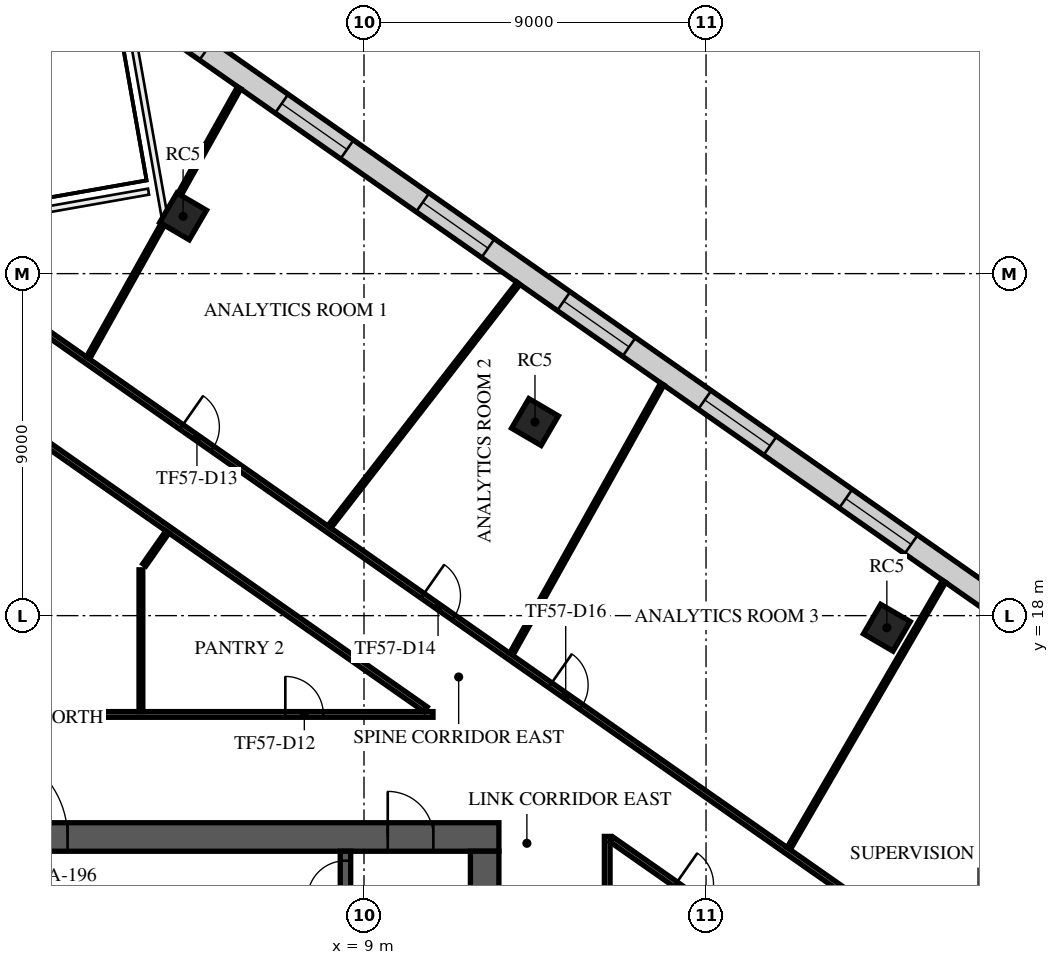
"""IFC4 building model, lengths in metres.
Left out: names, types, materials, properties, quantities, classifications, styles, units other than length and angle.
Written with IfcOpenShell. Run it as: python <this file> out.ifc"""

import sys

from ifc_helpers import new_model, si_unit, direction, frame, frame_2d, origin, origin_2d, place, context, subcontext, project, spatial, rectangle, extrude, element, fill, save


model = new_model("IFC4")
c1 = context("Model", 3, precision=1e-05, world=origin(), true_north=direction((0.0, 1.0)))
c2 = subcontext(c1, "Body", "Model", "MODEL_VIEW")
j1 = project(units=[si_unit("LENGTHUNIT", "METRE"), si_unit("PLANEANGLEUNIT", "RADIAN")], contexts=[c1])
p1 = place(None, origin())
s1 = spatial("IfcSite", under=j1, at=p1, CompositionType="ELEMENT")
p2 = place(p1, origin())
s2 = spatial("IfcBuilding", under=s1, at=p2, CompositionType="ELEMENT")
p3 = place(p2, frame((0.0, 0.0, 246.9)))
s3 = spatial("IfcBuildingStorey", under=s2, at=p3, CompositionType="ELEMENT", Elevation=246.9)
for number, where, z_axis, x_axis in (
    (1, (22.758, 17.682, 0.0), (0.0, 0.0, 1.0), (0.505, 0.863, 0.0)),
    (2, (13.499, 23.094, 0.0), (0.0, 0.0, 1.0), (0.505, 0.863, 0.0)),
    (3, (4.24, 28.506, 0.0), (0.0, 0.0, 1.0), (0.505, 0.863, 0.0)),
):
    element("IfcColumn", number, at=place(p3, frame(where, z_axis=z_axis, x_axis=x_axis)), inside=s3, PredefinedType="COLUMN", context=c2, shape_type="SweptSolid", body=[
        extrude(rectangle(XDim=0.9, YDim=0.9, at=origin_2d()), origin(), (0.0, 0.0, 1.0), 4.0),
    ])
p4 = place(p3, frame((-12.55, 12.175, 0.0), z_axis=(0.0, 0.0, 1.0), x_axis=(1.0, 0.0, 0.0)))
e4 = element("IfcWall", 4, at=p4, inside=s3, PredefinedType="SHEAR", context=c2, shape_type="SweptSolid", body=[
    extrude(rectangle(XDim=25.1, YDim=0.75, at=frame_2d((12.55, 0.0))), origin(), (0.0, 0.0, 1.0), 3.64),
])
p5 = place(p4, frame((11.35, 0.0, 0.0)))
e5 = element("IfcOpeningElement", 5, at=p5, cuts=e4, PredefinedType="OPENING", context=c2, shape_type="SweptSolid", body=[
    extrude(rectangle(XDim=2.4, YDim=2.4, at=frame_2d((1.2, 1.2))), frame((0.0, 0.385, 0.0), z_axis=(0.0, -1.0, 0.0), x_axis=(1.0, 0.0, 0.0)), (0.0, 0.0, 1.0), 0.77),
])
p6 = place(p4, frame((22.175, 0.0, 0.0)))
e6 = element("IfcOpeningElement", 6, at=p6, cuts=e4, PredefinedType="OPENING", context=c2, shape_type="SweptSolid", body=[
    extrude(rectangle(XDim=1.2, YDim=2.1, at=frame_2d((0.6, 1.05))), frame((0.0, 0.385, 0.0), z_axis=(0.0, -1.0, 0.0), x_axis=(1.0, 0.0, 0.0)), (0.0, 0.0, 1.0), 0.77),
])
p7 = place(p4, frame((1.15, 0.0, 0.0)))
e7 = element("IfcOpeningElement", 7, at=p7, cuts=e4, PredefinedType="OPENING", context=c2, shape_type="SweptSolid", body=[
    extrude(rectangle(XDim=1.0, YDim=2.1, at=frame_2d((0.5, 1.05))), frame((0.0, 0.385, 0.0), z_axis=(0.0, -1.0, 0.0), x_axis=(1.0, 0.0, 0.0)), (0.0, 0.0, 1.0), 0.77),
])
p8 = place(p3, frame((12.175, -11.8, 0.0), z_axis=(0.0, 0.0, 1.0), x_axis=(0.0, 1.0, 0.0)))
e8 = element("IfcWall", 8, at=p8, inside=s3, PredefinedType="SHEAR", context=c2, shape_type="SweptSolid", body=[
    extrude(rectangle(XDim=23.6, YDim=0.75, at=frame_2d((11.8, 0.0))), origin(), (0.0, 0.0, 1.0), 3.64),
])
p9 = place(p8, frame((10.6, 0.0, 0.0)))
e9 = element("IfcOpeningElement", 9, at=p9, cuts=e8, PredefinedType="OPENING", context=c2, shape_type="SweptSolid", body=[
    extrude(rectangle(XDim=2.4, YDim=2.4, at=frame_2d((1.2, 1.2))), frame((0.0, 0.385, 0.0), z_axis=(0.0, -1.0, 0.0), x_axis=(1.0, 0.0, 0.0)), (0.0, 0.0, 1.0), 0.77),
])
p10 = place(p3, frame((8.512, 4.55, 0.0), z_axis=(0.0, 0.0, 1.0), x_axis=(0.0, 1.0, 0.0)))
e10 = element("IfcWall", 10, at=p10, inside=s3, PredefinedType="SOLIDWALL", context=c2, shape_type="SweptSolid", body=[
    extrude(rectangle(XDim=7.25, YDim=0.275, at=frame_2d((3.625, 0.0))), origin(), (0.0, 0.0, 1.0), 3.64),
])
p11 = place(p10, frame((6.0, 0.0, 0.0)))
e11 = element("IfcOpeningElement", 11, at=p11, cuts=e10, PredefinedType="OPENING", context=c2, shape_type="SweptSolid", body=[
    extrude(rectangle(XDim=1.0, YDim=2.1, at=frame_2d((0.5, 1.05))), frame((0.0, 0.147, 0.0), z_axis=(0.0, -1.0, 0.0), x_axis=(1.0, 0.0, 0.0)), (0.0, 0.0, 1.0), 0.295),
])
p12 = place(p3, frame((31.815, 13.98, 0.0), z_axis=(0.0, 0.0, 1.0), x_axis=(-0.819152162902, 0.573576266955, 0.0)))
e12 = element("IfcWall", 12, at=p12, inside=s3, PredefinedType="STANDARD", context=c2, shape_type="SweptSolid", body=[
    extrude(rectangle(XDim=36.243, YDim=0.6, at=frame_2d((18.122, 0.0))), origin(), (0.0, 0.0, 1.0), 3.64),
])
p13 = place(p12, frame((1.215, 0.0, 0.9)))
e13 = element("IfcOpeningElement", 13, at=p13, cuts=e12, PredefinedType="OPENING", context=c2, shape_type="SweptSolid", body=[
    extrude(rectangle(XDim=2.1, YDim=2.1, at=frame_2d((1.05, 1.05))), frame((0.0, 0.31, 0.0), z_axis=(0.0, -1.0, 0.0), x_axis=(1.0, 0.0, 0.0)), (0.0, 0.0, 1.0), 0.62),
])
p14 = place(p12, frame((5.746, 0.0, 0.9)))
e14 = element("IfcOpeningElement", 14, at=p14, cuts=e12, PredefinedType="OPENING", context=c2, shape_type="SweptSolid", body=[
    extrude(rectangle(XDim=2.1, YDim=2.1, at=frame_2d((1.05, 1.05))), frame((0.0, 0.31, 0.0), z_axis=(0.0, -1.0, 0.0), x_axis=(1.0, 0.0, 0.0)), (0.0, 0.0, 1.0), 0.62),
])
p15 = place(p12, frame((10.276, 0.0, 0.9)))
e15 = element("IfcOpeningElement", 15, at=p15, cuts=e12, PredefinedType="OPENING", context=c2, shape_type="SweptSolid", body=[
    extrude(rectangle(XDim=2.1, YDim=2.1, at=frame_2d((1.05, 1.05))), frame((0.0, 0.31, 0.0), z_axis=(0.0, -1.0, 0.0), x_axis=(1.0, 0.0, 0.0)), (0.0, 0.0, 1.0), 0.62),
])
p16 = place(p12, frame((14.806, 0.0, 0.9)))
e16 = element("IfcOpeningElement", 16, at=p16, cuts=e12, PredefinedType="OPENING", context=c2, shape_type="SweptSolid", body=[
    extrude(rectangle(XDim=2.1, YDim=2.1, at=frame_2d((1.05, 1.05))), frame((0.0, 0.31, 0.0), z_axis=(0.0, -1.0, 0.0), x_axis=(1.0, 0.0, 0.0)), (0.0, 0.0, 1.0), 0.62),
])
p17 = place(p12, frame((19.337, 0.0, 0.9)))
e17 = element("IfcOpeningElement", 17, at=p17, cuts=e12, PredefinedType="OPENING", context=c2, shape_type="SweptSolid", body=[
    extrude(rectangle(XDim=2.1, YDim=2.1, at=frame_2d((1.05, 1.05))), frame((0.0, 0.31, 0.0), z_axis=(0.0, -1.0, 0.0), x_axis=(1.0, 0.0, 0.0)), (0.0, 0.0, 1.0), 0.62),
])
p18 = place(p12, frame((23.867, 0.0, 0.9)))
e18 = element("IfcOpeningElement", 18, at=p18, cuts=e12, PredefinedType="OPENING", context=c2, shape_type="SweptSolid", body=[
    extrude(rectangle(XDim=2.1, YDim=2.1, at=frame_2d((1.05, 1.05))), frame((0.0, 0.31, 0.0), z_axis=(0.0, -1.0, 0.0), x_axis=(1.0, 0.0, 0.0)), (0.0, 0.0, 1.0), 0.62),
])
p19 = place(p12, frame((28.398, 0.0, 0.9)))
e19 = element("IfcOpeningElement", 19, at=p19, cuts=e12, PredefinedType="OPENING", context=c2, shape_type="SweptSolid", body=[
    extrude(rectangle(XDim=2.1, YDim=2.1, at=frame_2d((1.05, 1.05))), frame((0.0, 0.31, 0.0), z_axis=(0.0, -1.0, 0.0), x_axis=(1.0, 0.0, 0.0)), (0.0, 0.0, 1.0), 0.62),
])
p20 = place(p12, frame((32.928, 0.0, 0.9)))
e20 = element("IfcOpeningElement", 20, at=p20, cuts=e12, PredefinedType="OPENING", context=c2, shape_type="SweptSolid", body=[
    extrude(rectangle(XDim=2.1, YDim=2.1, at=frame_2d((1.05, 1.05))), frame((0.0, 0.31, 0.0), z_axis=(0.0, -1.0, 0.0), x_axis=(1.0, 0.0, 0.0)), (0.0, 0.0, 1.0), 0.62),
])
p21 = place(p3, frame((-15.325, 15.4, 0.0), z_axis=(0.0, 0.0, 1.0), x_axis=(1.0, 0.0, 0.0)))
e21 = element("IfcWall", 21, at=p21, inside=s3, PredefinedType="PARTITIONING", context=c2, shape_type="SweptSolid", body=[
    extrude(rectangle(XDim=26.141, YDim=0.15, at=frame_2d((13.07, 0.0))), origin(), (0.0, 0.0, 1.0), 3.24),
])
p22 = place(p21, frame((9.55, 0.0, 0.0)))
e22 = element("IfcOpeningElement", 22, at=p22, cuts=e21, PredefinedType="OPENING", context=c2, shape_type="SweptSolid", body=[
    extrude(rectangle(XDim=1.0, YDim=2.1, at=frame_2d((0.5, 1.05))), frame((0.0, 0.085, 0.0), z_axis=(0.0, -1.0, 0.0), x_axis=(1.0, 0.0, 0.0)), (0.0, 0.0, 1.0), 0.17),
])
p23 = place(p21, frame((22.255, 0.0, 0.0)))
e23 = element("IfcOpeningElement", 23, at=p23, cuts=e21, PredefinedType="OPENING", context=c2, shape_type="SweptSolid", body=[
    extrude(rectangle(XDim=1.0, YDim=2.1, at=frame_2d((0.5, 1.05))), frame((0.0, 0.085, 0.0), z_axis=(0.0, -1.0, 0.0), x_axis=(1.0, 0.0, 0.0)), (0.0, 0.0, 1.0), 0.17),
])
p24 = place(p3, frame((-3.266, 25.26, 0.0), z_axis=(0.0, 0.0, 1.0), x_axis=(0.819150723298, -0.573578322917, 0.0)))
e24 = element("IfcWall", 24, at=p24, inside=s3, PredefinedType="PARTITIONING", context=c2, shape_type="SweptSolid", body=[
    extrude(rectangle(XDim=16.953, YDim=0.15, at=frame_2d((8.476, 0.0))), origin(), (0.0, 0.0, 1.0), 3.24),
])
p25 = place(p24, frame((2.55, 0.0, 0.0)))
e25 = element("IfcOpeningElement", 25, at=p25, cuts=e24, PredefinedType="OPENING", context=c2, shape_type="SweptSolid", body=[
    extrude(rectangle(XDim=1.8, YDim=2.1, at=frame_2d((0.9, 1.05))), frame((0.0, 0.085, 0.0), z_axis=(0.0, -1.0, 0.0), x_axis=(1.0, 0.0, 0.0)), (0.0, 0.0, 1.0), 0.17),
])
p26 = place(p3, frame((-1.89, 27.226, 0.0), z_axis=(0.0, 0.0, 1.0), x_axis=(0.819163235761, -0.573560452941, 0.0)))
e26 = element("IfcWall", 26, at=p26, inside=s3, PredefinedType="PARTITIONING", context=c2, shape_type="SweptSolid", body=[
    extrude(rectangle(XDim=34.403, YDim=0.15, at=frame_2d((17.202, 0.0))), origin(), (0.0, 0.0, 1.0), 3.24),
])
p27 = place(p26, frame((7.427, 0.0, 0.0)))
e27 = element("IfcOpeningElement", 27, at=p27, cuts=e26, PredefinedType="OPENING", context=c2, shape_type="SweptSolid", body=[
    extrude(rectangle(XDim=1.0, YDim=2.1, at=frame_2d((0.5, 1.05))), frame((0.0, 0.085, 0.0), z_axis=(0.0, -1.0, 0.0), x_axis=(1.0, 0.0, 0.0)), (0.0, 0.0, 1.0), 0.17),
])
p28 = place(p26, frame((15.173, 0.0, 0.0)))
e28 = element("IfcOpeningElement", 28, at=p28, cuts=e26, PredefinedType="OPENING", context=c2, shape_type="SweptSolid", body=[
    extrude(rectangle(XDim=1.0, YDim=2.1, at=frame_2d((0.5, 1.05))), frame((0.0, 0.085, 0.0), z_axis=(0.0, -1.0, 0.0), x_axis=(1.0, 0.0, 0.0)), (0.0, 0.0, 1.0), 0.17),
])
p29 = place(p26, frame((19.273, 0.0, 0.0)))
e29 = element("IfcOpeningElement", 29, at=p29, cuts=e26, PredefinedType="OPENING", context=c2, shape_type="SweptSolid", body=[
    extrude(rectangle(XDim=1.0, YDim=2.1, at=frame_2d((0.5, 1.05))), frame((0.0, 0.085, 0.0), z_axis=(0.0, -1.0, 0.0), x_axis=(1.0, 0.0, 0.0)), (0.0, 0.0, 1.0), 0.17),
])
p30 = place(p3, frame((15.4, 2.664, 0.0), z_axis=(0.0, 0.0, 1.0), x_axis=(0.0, 1.0, 0.0)))
e30 = element("IfcWall", 30, at=p30, inside=s3, PredefinedType="PARTITIONING", context=c2, shape_type="SweptSolid", body=[
    extrude(rectangle(XDim=9.526, YDim=0.15, at=frame_2d((4.763, 0.0))), origin(), (0.0, 0.0, 1.0), 3.24),
])
p31 = place(p3, frame((15.518, 12.107, 0.0), z_axis=(0.0, 0.0, 1.0), x_axis=(0.819171924474, -0.573548043457, 0.0)))
e31 = element("IfcWall", 31, at=p31, inside=s3, PredefinedType="PARTITIONING", context=c2, shape_type="SweptSolid", body=[
    extrude(rectangle(XDim=11.471, YDim=0.15, at=frame_2d((5.736, 0.0))), origin(), (0.0, 0.0, 1.0), 3.24),
])
p32 = place(p31, frame((2.05, 0.0, 0.0)))
e32 = element("IfcOpeningElement", 32, at=p32, cuts=e31, PredefinedType="OPENING", context=c2, shape_type="SweptSolid", body=[
    extrude(rectangle(XDim=1.0, YDim=2.1, at=frame_2d((0.5, 1.05))), frame((0.0, 0.085, 0.0), z_axis=(0.0, -1.0, 0.0), x_axis=(1.0, 0.0, 0.0)), (0.0, 0.0, 1.0), 0.17),
])
p33 = place(p31, frame((10.027, 0.0, 0.0)))
e33 = element("IfcOpeningElement", 33, at=p33, cuts=e31, PredefinedType="OPENING", context=c2, shape_type="SweptSolid", body=[
    extrude(rectangle(XDim=1.0, YDim=2.1, at=frame_2d((0.5, 1.05))), frame((0.0, 0.085, 0.0), z_axis=(0.0, -1.0, 0.0), x_axis=(1.0, 0.0, 0.0)), (0.0, 0.0, 1.0), 0.17),
])
p34 = place(p3, frame((1.739, 24.783, 0.0), z_axis=(0.0, 0.0, 1.0), x_axis=(0.488204523876, 0.872729249462, 0.0)))
e34 = element("IfcWall", 34, at=p34, inside=s3, PredefinedType="PARTITIONING", context=c2, shape_type="SweptSolid", body=[
    extrude(rectangle(XDim=4.027, YDim=0.1, at=frame_2d((2.013, 0.0))), origin(), (0.0, 0.0, 1.0), 3.24),
])
p35 = place(p3, frame((3.13, 15.475, 0.0), z_axis=(0.0, 0.0, 1.0), x_axis=(0.0, 1.0, 0.0)))
e35 = element("IfcWall", 35, at=p35, inside=s3, PredefinedType="PARTITIONING", context=c2, shape_type="SweptSolid", body=[
    extrude(rectangle(XDim=3.731, YDim=0.1, at=frame_2d((1.865, 0.0))), origin(), (0.0, 0.0, 1.0), 3.64),
])
p36 = place(p3, frame((3.221, 19.336, 0.0), z_axis=(0.0, 0.0, 1.0), x_axis=(0.573214319636, 0.819405481898, 0.0)))
e36 = element("IfcWall", 36, at=p36, inside=s3, PredefinedType="PARTITIONING", context=c2, shape_type="SweptSolid", body=[
    extrude(rectangle(XDim=1.057, YDim=0.1, at=frame_2d((0.529, 0.0))), origin(), (0.0, 0.0, 1.0), 3.24),
])
p37 = place(p3, frame((4.145, 29.083, 0.0), z_axis=(0.0, 0.0, 1.0), x_axis=(0.488182285446, 0.872741689263, 0.0)))
e37 = element("IfcWall", 37, at=p37, inside=s3, PredefinedType="PARTITIONING", context=c2, shape_type="SweptSolid", body=[
    extrude(rectangle(XDim=3.214, YDim=0.1, at=frame_2d((1.607, 0.0))), origin(), (0.0, 0.0, 1.0), 3.64),
])
p38 = place(p3, frame((8.089, 20.334, 0.0), z_axis=(0.0, 0.0, 1.0), x_axis=(0.613179783631, 0.789943385912, 0.0)))
e38 = element("IfcWall", 38, at=p38, inside=s3, PredefinedType="PARTITIONING", context=c2, shape_type="SweptSolid", body=[
    extrude(rectangle(XDim=8.112, YDim=0.1, at=frame_2d((4.056, 0.0))), origin(), (0.0, 0.0, 1.0), 3.24),
])
p39 = place(p3, frame((12.876, 16.985, 0.0), z_axis=(0.0, 0.0, 1.0), x_axis=(0.487744732035, 0.872986297929, 0.0)))
e39 = element("IfcWall", 39, at=p39, inside=s3, PredefinedType="PARTITIONING", context=c2, shape_type="SweptSolid", body=[
    extrude(rectangle(XDim=8.141, YDim=0.1, at=frame_2d((4.07, 0.0))), origin(), (0.0, 0.0, 1.0), 3.24),
])
p40 = place(p3, frame((20.177, 11.873, 0.0), z_axis=(0.0, 0.0, 1.0), x_axis=(0.502475319919, 0.864591552626, 0.0)))
e40 = element("IfcWall", 40, at=p40, inside=s3, PredefinedType="PARTITIONING", context=c2, shape_type="SweptSolid", body=[
    extrude(rectangle(XDim=8.128, YDim=0.1, at=frame_2d((4.064, 0.0))), origin(), (0.0, 0.0, 1.0), 3.24),
])
p41 = place(p5, origin())
e41 = element("IfcDoor", 41, at=p41, inside=s3, OperationType="SINGLE_SWING_LEFT", PredefinedType="DOOR", context=c2, shape_type="SweptSolid", body=[
    extrude(rectangle(XDim=2.4, YDim=2.4, at=frame_2d((1.2, 1.2))), frame((0.0, 0.025, 0.0), z_axis=(0.0, -1.0, 0.0), x_axis=(1.0, 0.0, 0.0)), (0.0, 0.0, 1.0), 0.05),
])
fill(e5, e41)
p42 = place(p6, origin())
e42 = element("IfcDoor", 42, at=p42, inside=s3, OperationType="SINGLE_SWING_LEFT", PredefinedType="DOOR", context=c2, shape_type="SweptSolid", body=[
    extrude(rectangle(XDim=1.2, YDim=2.1, at=frame_2d((0.6, 1.05))), frame((0.0, 0.025, 0.0), z_axis=(0.0, -1.0, 0.0), x_axis=(1.0, 0.0, 0.0)), (0.0, 0.0, 1.0), 0.05),
])
fill(e6, e42)
p43 = place(p11, origin())
e43 = element("IfcDoor", 43, at=p43, inside=s3, OperationType="SINGLE_SWING_LEFT", PredefinedType="DOOR", context=c2, shape_type="SweptSolid", body=[
    extrude(rectangle(XDim=1.0, YDim=2.1, at=frame_2d((0.5, 1.05))), frame((0.0, 0.025, 0.0), z_axis=(0.0, -1.0, 0.0), x_axis=(1.0, 0.0, 0.0)), (0.0, 0.0, 1.0), 0.05),
])
fill(e11, e43)
p44 = place(p15, origin())
e44 = element("IfcWindow", 44, at=p44, inside=s3, PartitioningType="SINGLE_PANEL", PredefinedType="WINDOW", context=c2, shape_type="SweptSolid", body=[
    extrude(rectangle(XDim=2.1, YDim=2.1, at=frame_2d((1.05, 1.05))), frame((0.0, 0.03, 0.0), z_axis=(0.0, -1.0, 0.0), x_axis=(1.0, 0.0, 0.0)), (0.0, 0.0, 1.0), 0.06),
])
fill(e15, e44)
p45 = place(p16, origin())
e45 = element("IfcWindow", 45, at=p45, inside=s3, PartitioningType="SINGLE_PANEL", PredefinedType="WINDOW", context=c2, shape_type="SweptSolid", body=[
    extrude(rectangle(XDim=2.1, YDim=2.1, at=frame_2d((1.05, 1.05))), frame((0.0, 0.03, 0.0), z_axis=(0.0, -1.0, 0.0), x_axis=(1.0, 0.0, 0.0)), (0.0, 0.0, 1.0), 0.06),
])
fill(e16, e45)
p46 = place(p17, origin())
e46 = element("IfcWindow", 46, at=p46, inside=s3, PartitioningType="SINGLE_PANEL", PredefinedType="WINDOW", context=c2, shape_type="SweptSolid", body=[
    extrude(rectangle(XDim=2.1, YDim=2.1, at=frame_2d((1.05, 1.05))), frame((0.0, 0.03, 0.0), z_axis=(0.0, -1.0, 0.0), x_axis=(1.0, 0.0, 0.0)), (0.0, 0.0, 1.0), 0.06),
])
fill(e17, e46)
p47 = place(p18, origin())
e47 = element("IfcWindow", 47, at=p47, inside=s3, PartitioningType="SINGLE_PANEL", PredefinedType="WINDOW", context=c2, shape_type="SweptSolid", body=[
    extrude(rectangle(XDim=2.1, YDim=2.1, at=frame_2d((1.05, 1.05))), frame((0.0, 0.03, 0.0), z_axis=(0.0, -1.0, 0.0), x_axis=(1.0, 0.0, 0.0)), (0.0, 0.0, 1.0), 0.06),
])
fill(e18, e47)
p48 = place(p19, origin())
e48 = element("IfcWindow", 48, at=p48, inside=s3, PartitioningType="SINGLE_PANEL", PredefinedType="WINDOW", context=c2, shape_type="SweptSolid", body=[
    extrude(rectangle(XDim=2.1, YDim=2.1, at=frame_2d((1.05, 1.05))), frame((0.0, 0.03, 0.0), z_axis=(0.0, -1.0, 0.0), x_axis=(1.0, 0.0, 0.0)), (0.0, 0.0, 1.0), 0.06),
])
fill(e19, e48)
p49 = place(p20, origin())
e49 = element("IfcWindow", 49, at=p49, inside=s3, PartitioningType="SINGLE_PANEL", PredefinedType="WINDOW", context=c2, shape_type="SweptSolid", body=[
    extrude(rectangle(XDim=2.1, YDim=2.1, at=frame_2d((1.05, 1.05))), frame((0.0, 0.03, 0.0), z_axis=(0.0, -1.0, 0.0), x_axis=(1.0, 0.0, 0.0)), (0.0, 0.0, 1.0), 0.06),
])
fill(e20, e49)
p50 = place(p23, origin())
e50 = element("IfcDoor", 50, at=p50, inside=s3, OperationType="SINGLE_SWING_LEFT", PredefinedType="DOOR", context=c2, shape_type="SweptSolid", body=[
    extrude(rectangle(XDim=1.0, YDim=2.1, at=frame_2d((0.5, 1.05))), frame((0.0, 0.025, 0.0), z_axis=(0.0, -1.0, 0.0), x_axis=(1.0, 0.0, 0.0)), (0.0, 0.0, 1.0), 0.05),
])
fill(e23, e50)
p51 = place(p27, origin())
e51 = element("IfcDoor", 51, at=p51, inside=s3, OperationType="SINGLE_SWING_LEFT", PredefinedType="DOOR", context=c2, shape_type="SweptSolid", body=[
    extrude(rectangle(XDim=1.0, YDim=2.1, at=frame_2d((0.5, 1.05))), frame((0.0, 0.025, 0.0), z_axis=(0.0, -1.0, 0.0), x_axis=(1.0, 0.0, 0.0)), (0.0, 0.0, 1.0), 0.05),
])
fill(e27, e51)
p52 = place(p28, origin())
e52 = element("IfcDoor", 52, at=p52, inside=s3, OperationType="SINGLE_SWING_RIGHT", PredefinedType="DOOR", context=c2, shape_type="SweptSolid", body=[
    extrude(rectangle(XDim=1.0, YDim=2.1, at=frame_2d((0.5, 1.05))), frame((0.0, 0.025, 0.0), z_axis=(0.0, -1.0, 0.0), x_axis=(1.0, 0.0, 0.0)), (0.0, 0.0, 1.0), 0.05),
])
fill(e28, e52)
p53 = place(p32, frame((1.0, 0.0, 0.0), z_axis=(0.0, 0.0, 1.0), x_axis=(-1.0, 0.0, 0.0)))
e53 = element("IfcDoor", 53, at=p53, inside=s3, OperationType="SINGLE_SWING_LEFT", PredefinedType="DOOR", context=c2, shape_type="SweptSolid", body=[
    extrude(rectangle(XDim=1.0, YDim=2.1, at=frame_2d((0.5, 1.05))), frame((0.0, 0.025, 0.0), z_axis=(0.0, -1.0, 0.0), x_axis=(1.0, 0.0, 0.0)), (0.0, 0.0, 1.0), 0.05),
])
fill(e32, e53)
p54 = place(p29, origin())
e54 = element("IfcDoor", 54, at=p54, inside=s3, OperationType="SINGLE_SWING_LEFT", PredefinedType="DOOR", context=c2, shape_type="SweptSolid", body=[
    extrude(rectangle(XDim=1.0, YDim=2.1, at=frame_2d((0.5, 1.05))), frame((0.0, 0.025, 0.0), z_axis=(0.0, -1.0, 0.0), x_axis=(1.0, 0.0, 0.0)), (0.0, 0.0, 1.0), 0.05),
])
fill(e29, e54)
save(model, sys.argv[1])
